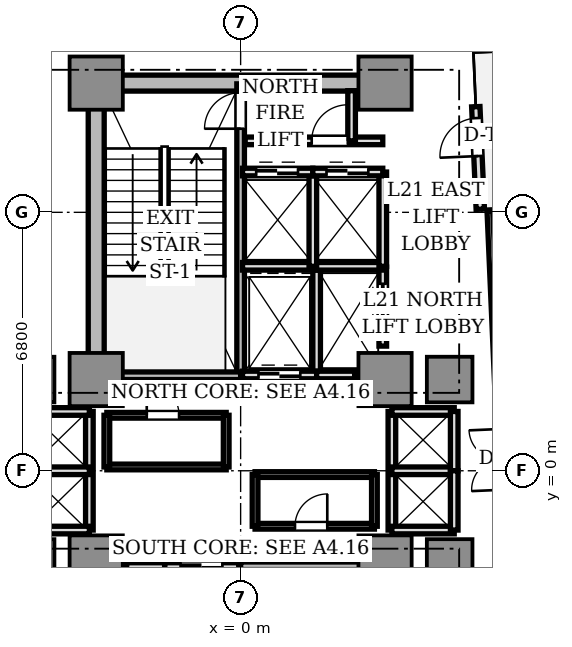
"""IFC4 building model, lengths in metres.
Left out: names, types, materials, properties, quantities, classifications, styles, units other than length and angle.
Written with IfcOpenShell. Run it as: python <this file> out.ifc"""

import sys

from ifc_helpers import new_model, si_unit, direction, frame, frame_2d, origin, origin_2d, place, context, subcontext, project, spatial, rectangle, extrude, source, transform, mapped, element, fill, save


model = new_model("IFC4")
c1 = context("Model", 3, precision=1e-05, world=origin(), true_north=direction((0.0, 1.0)))
c2 = subcontext(c1, "Body", "Model", "MODEL_VIEW")
j1 = project(units=[si_unit("LENGTHUNIT", "METRE"), si_unit("PLANEANGLEUNIT", "RADIAN")], contexts=[c1])
p1 = place(None, origin())
s1 = spatial("IfcSite", under=j1, at=p1, CompositionType="ELEMENT")
p2 = place(p1, origin())
s2 = spatial("IfcBuilding", under=s1, at=p2, CompositionType="ELEMENT")
p3 = place(p2, frame((0.0, 0.0, 79.0)))
s3 = spatial("IfcBuildingStorey", under=s2, at=p3, CompositionType="ELEMENT", Elevation=79.0)
p4 = place(p3, frame((-3.55, 10.2, 0.0), z_axis=(0.0, 0.0, 1.0), x_axis=(1.0, 0.0, 0.0)))
e1 = element("IfcWall", 1, at=p4, inside=s3, PredefinedType="SHEAR", context=c2, shape_type="SweptSolid", body=[
    extrude(rectangle(XDim=7.1, YDim=0.42, at=frame_2d((3.55, 0.0))), origin(), (0.0, 0.0, 1.0), 4.26),
])
p5 = place(p3, frame((-3.8, 2.85, 0.0), z_axis=(0.0, 0.0, 1.0), x_axis=(0.0, 1.0, 0.0)))
e2 = element("IfcWall", 2, at=p5, inside=s3, PredefinedType="SHEAR", context=c2, shape_type="SweptSolid", body=[
    extrude(rectangle(XDim=6.9, YDim=0.42, at=frame_2d((3.45, 0.0))), origin(), (0.0, 0.0, 1.0), 4.26),
])
m1 = source(origin(), c2, "Body", "SweptSolid", [
    extrude(rectangle(XDim=1.4, YDim=1.4, at=origin_2d()), origin(), (0.0, 0.0, 1.0), 4.26),
])
for number, where, z_axis, x_axis in (
    (3, (-3.8, 2.4, 0.0), (0.0, 0.0, 1.0), (1.0, 0.0, 0.0)),
    (4, (3.8, 2.4, 0.0), (0.0, 0.0, 1.0), (1.0, 0.0, 0.0)),
    (5, (-3.8, 10.2, 0.0), (0.0, 0.0, 1.0), (1.0, 0.0, 0.0)),
    (6, (3.8, 10.2, 0.0), (0.0, 0.0, 1.0), (1.0, 0.0, 0.0)),
    (7, (-3.8, -2.4, 0.0), (0.0, 0.0, 1.0), (1.0, 0.0, 0.0)),
    (8, (3.8, -2.4, 0.0), (0.0, 0.0, 1.0), (1.0, 0.0, 0.0)),
):
    element("IfcColumn", number, at=place(p3, frame(where, z_axis=z_axis, x_axis=x_axis)), inside=s3, PredefinedType="COLUMN", context=c2, shape_type="MappedRepresentation", body=[
        mapped(m1, transform((0.0, 0.0, 0.0), scale=1.0)),
    ])
m2 = source(origin(), c2, "Body", "SweptSolid", [
    extrude(rectangle(XDim=1.2, YDim=1.2, at=origin_2d()), origin(), (0.0, 0.0, 1.0), 4.26),
])
for number, where, z_axis, x_axis in (
    (9, (5.5, 2.4, 0.0), (0.0, 0.0, 1.0), (1.0, 0.0, 0.0)),
    (10, (-5.5, 2.4, 0.0), (0.0, 0.0, 1.0), (1.0, 0.0, 0.0)),
    (11, (5.5, -2.4, 0.0), (0.0, 0.0, 1.0), (1.0, 0.0, 0.0)),
    (12, (-5.5, -2.4, 0.0), (0.0, 0.0, 1.0), (1.0, 0.0, 0.0)),
):
    element("IfcColumn", number, at=place(p3, frame(where, z_axis=z_axis, x_axis=x_axis)), inside=s3, PredefinedType="COLUMN", context=c2, shape_type="MappedRepresentation", body=[
        mapped(m2, transform((0.0, 0.0, 0.0), scale=1.0)),
    ])
p6 = place(p3, frame((6.306, 6.882, 0.0), z_axis=(0.0, 0.0, 1.0), x_axis=(-0.043672655174, 0.999045894436, 0.0)))
e13 = element("IfcWall", 13, at=p6, inside=s3, PredefinedType="STANDARD", context=c2, shape_type="SweptSolid", body=[
    extrude(rectangle(XDim=2.7, YDim=0.22, at=frame_2d((1.35, 0.0))), origin(), (0.0, 0.0, 1.0), 4.26),
])
p7 = place(p6, frame((1.4, 0.0, 0.0)))
e14 = element("IfcOpeningElement", 14, at=p7, cuts=e13, PredefinedType="OPENING", context=c2, shape_type="SweptSolid", body=[
    extrude(rectangle(XDim=1.0, YDim=2.2, at=frame_2d((0.5, 1.1))), frame((0.0, 0.12, 0.0), z_axis=(0.0, -1.0, 0.0), x_axis=(1.0, 0.0, 0.0)), (0.0, 0.0, 1.0), 0.24),
])
p8 = place(p3, frame((0.0, 2.5, 0.0), z_axis=(0.0, 0.0, 1.0), x_axis=(0.0, 1.0, 0.0)))
e15 = element("IfcWall", 15, at=p8, inside=s3, PredefinedType="SOLIDWALL", context=c2, shape_type="SweptSolid", body=[
    extrude(rectangle(XDim=7.68, YDim=0.2, at=frame_2d((3.84, 0.0))), origin(), (0.0, 0.0, 1.0), 4.26),
])
p9 = place(p8, frame((6.5, 0.0, 0.0)))
e16 = element("IfcOpeningElement", 16, at=p9, cuts=e15, PredefinedType="OPENING", context=c2, shape_type="SweptSolid", body=[
    extrude(rectangle(XDim=0.95, YDim=2.15, at=frame_2d((0.475, 1.075))), frame((0.0, 0.11, 0.0), z_axis=(0.0, -1.0, 0.0), x_axis=(1.0, 0.0, 0.0)), (0.0, 0.0, 1.0), 0.22),
])
p10 = place(p3, frame((-3.72, 2.5, 0.0), z_axis=(0.0, 0.0, 1.0), x_axis=(1.0, 0.0, 0.0)))
e17 = element("IfcWall", 17, at=p10, inside=s3, PredefinedType="SOLIDWALL", context=c2, shape_type="SweptSolid", body=[
    extrude(rectangle(XDim=3.72, YDim=0.2, at=frame_2d((1.86, 0.0))), origin(), (0.0, 0.0, 1.0), 4.26),
])
p11 = place(p3, frame((0.0, -10.18, 0.0), z_axis=(0.0, 0.0, 1.0), x_axis=(0.0, 1.0, 0.0)))
e18 = element("IfcWall", 18, at=p11, inside=s3, PredefinedType="SOLIDWALL", context=c2, shape_type="SweptSolid", body=[
    extrude(rectangle(XDim=7.68, YDim=0.2, at=frame_2d((3.84, 0.0))), origin(), (0.0, 0.0, 1.0), 4.26),
])
p12 = place(p11, frame((0.28, 0.0, 0.0)))
e19 = element("IfcOpeningElement", 19, at=p12, cuts=e18, PredefinedType="OPENING", context=c2, shape_type="SweptSolid", body=[
    extrude(rectangle(XDim=1.1, YDim=2.15, at=frame_2d((0.55, 1.075))), frame((0.0, 0.11, 0.0), z_axis=(0.0, -1.0, 0.0), x_axis=(1.0, 0.0, 0.0)), (0.0, 0.0, 1.0), 0.22),
])
p13 = place(p3, frame((0.0, -2.5, 0.0), z_axis=(0.0, 0.0, 1.0), x_axis=(1.0, 0.0, 0.0)))
e20 = element("IfcWall", 20, at=p13, inside=s3, PredefinedType="SOLIDWALL", context=c2, shape_type="SweptSolid", body=[
    extrude(rectangle(XDim=3.72, YDim=0.2, at=frame_2d((1.86, 0.0))), origin(), (0.0, 0.0, 1.0), 4.26),
])
p14 = place(p3, frame((2.0, 2.5, 0.0), z_axis=(0.0, 0.0, 1.0), x_axis=(0.0, 1.0, 0.0)))
e21 = element("IfcWall", 21, at=p14, inside=s3, PredefinedType="SOLIDWALL", context=c2, shape_type="SweptSolid", body=[
    extrude(rectangle(XDim=2.78, YDim=0.2, at=frame_2d((1.39, 0.0))), origin(), (0.0, 0.0, 1.0), 3.81),
])
p15 = place(p3, frame((0.05, 2.52, 0.0), z_axis=(0.0, 0.0, 1.0), x_axis=(1.0, 0.0, 0.0)))
e22 = element("IfcWall", 22, at=p15, inside=s3, PredefinedType="SOLIDWALL", context=c2, shape_type="SweptSolid", body=[
    extrude(rectangle(XDim=1.95, YDim=0.2, at=frame_2d((0.975, 0.0))), origin(), (0.0, 0.0, 1.0), 3.81),
])
p16 = place(p15, frame((0.42, 0.0, 0.0)))
e23 = element("IfcOpeningElement", 23, at=p16, cuts=e22, PredefinedType="OPENING", context=c2, shape_type="SweptSolid", body=[
    extrude(rectangle(XDim=1.1, YDim=2.2, at=frame_2d((0.55, 1.1))), frame((0.0, 0.11, 0.0), z_axis=(0.0, -1.0, 0.0), x_axis=(1.0, 0.0, 0.0)), (0.0, 0.0, 1.0), 0.22),
])
p17 = place(p3, frame((-2.0, -5.28, 0.0), z_axis=(0.0, 0.0, 1.0), x_axis=(0.0, 1.0, 0.0)))
e24 = element("IfcWall", 24, at=p17, inside=s3, PredefinedType="SOLIDWALL", context=c2, shape_type="SweptSolid", body=[
    extrude(rectangle(XDim=2.78, YDim=0.2, at=frame_2d((1.39, 0.0))), origin(), (0.0, 0.0, 1.0), 3.81),
])
p18 = place(p3, frame((-2.0, -2.52, 0.0), z_axis=(0.0, 0.0, 1.0), x_axis=(1.0, 0.0, 0.0)))
e25 = element("IfcWall", 25, at=p18, inside=s3, PredefinedType="SOLIDWALL", context=c2, shape_type="SweptSolid", body=[
    extrude(rectangle(XDim=1.95, YDim=0.2, at=frame_2d((0.975, 0.0))), origin(), (0.0, 0.0, 1.0), 3.81),
])
p19 = place(p18, frame((0.42, 0.0, 0.0)))
e26 = element("IfcOpeningElement", 26, at=p19, cuts=e25, PredefinedType="OPENING", context=c2, shape_type="SweptSolid", body=[
    extrude(rectangle(XDim=1.1, YDim=2.2, at=frame_2d((0.55, 1.1))), frame((0.0, 0.11, 0.0), z_axis=(0.0, -1.0, 0.0), x_axis=(1.0, 0.0, 0.0)), (0.0, 0.0, 1.0), 0.22),
])
p20 = place(p3, frame((2.0, 2.52, 0.0), z_axis=(0.0, 0.0, 1.0), x_axis=(1.0, 0.0, 0.0)))
e27 = element("IfcWall", 27, at=p20, inside=s3, PredefinedType="SOLIDWALL", context=c2, shape_type="SweptSolid", body=[
    extrude(rectangle(XDim=1.0, YDim=0.2, at=frame_2d((0.5, 0.0))), origin(), (0.0, 0.0, 1.0), 3.81),
])
p21 = place(p3, frame((3.74, 3.28, 0.0), z_axis=(0.0, 0.0, 1.0), x_axis=(0.0, 1.0, 0.0)))
e28 = element("IfcWall", 28, at=p21, inside=s3, PredefinedType="SOLIDWALL", context=c2, shape_type="SweptSolid", body=[
    extrude(rectangle(XDim=2.08, YDim=0.2, at=frame_2d((1.04, 0.0))), origin(), (0.0, 0.0, 1.0), 3.81),
])
p22 = place(p21, frame((0.44, 0.0, 0.0)))
e29 = element("IfcOpeningElement", 29, at=p22, cuts=e28, PredefinedType="OPENING", context=c2, shape_type="SweptSolid", body=[
    extrude(rectangle(XDim=1.2, YDim=2.2, at=frame_2d((0.6, 1.1))), frame((0.0, 0.11, 0.0), z_axis=(0.0, -1.0, 0.0), x_axis=(1.0, 0.0, 0.0)), (0.0, 0.0, 1.0), 0.22),
])
p23 = place(p3, frame((-3.0, -2.52, 0.0), z_axis=(0.0, 0.0, 1.0), x_axis=(1.0, 0.0, 0.0)))
e30 = element("IfcWall", 30, at=p23, inside=s3, PredefinedType="SOLIDWALL", context=c2, shape_type="SweptSolid", body=[
    extrude(rectangle(XDim=1.0, YDim=0.2, at=frame_2d((0.5, 0.0))), origin(), (0.0, 0.0, 1.0), 3.81),
])
p24 = place(p3, frame((0.05, 5.38, 0.0), z_axis=(0.0, 0.0, 1.0), x_axis=(1.0, 0.0, 0.0)))
e31 = element("IfcWall", 31, at=p24, inside=s3, PredefinedType="SOLIDWALL", context=c2, shape_type="SweptSolid", body=[
    extrude(rectangle(XDim=3.69, YDim=0.2, at=frame_2d((1.845, 0.0))), origin(), (0.0, 0.0, 1.0), 3.81),
])
p25 = place(p3, frame((1.9, 5.38, 0.0), z_axis=(0.0, 0.0, 1.0), x_axis=(0.0, 1.0, 0.0)))
e32 = element("IfcWall", 32, at=p25, inside=s3, PredefinedType="SOLIDWALL", context=c2, shape_type="SweptSolid", body=[
    extrude(rectangle(XDim=2.48, YDim=0.2, at=frame_2d((1.24, 0.0))), origin(), (0.0, 0.0, 1.0), 3.81),
])
p26 = place(p3, frame((0.05, 7.86, 0.0), z_axis=(0.0, 0.0, 1.0), x_axis=(1.0, 0.0, 0.0)))
e33 = element("IfcWall", 33, at=p26, inside=s3, PredefinedType="SOLIDWALL", context=c2, shape_type="SweptSolid", body=[
    extrude(rectangle(XDim=1.85, YDim=0.2, at=frame_2d((0.925, 0.0))), origin(), (0.0, 0.0, 1.0), 3.81),
])
p27 = place(p26, frame((0.36, 0.0, 0.0)))
e34 = element("IfcOpeningElement", 34, at=p27, cuts=e33, PredefinedType="OPENING", context=c2, shape_type="SweptSolid", body=[
    extrude(rectangle(XDim=1.1, YDim=2.2, at=frame_2d((0.55, 1.1))), frame((0.0, 0.11, 0.0), z_axis=(0.0, -1.0, 0.0), x_axis=(1.0, 0.0, 0.0)), (0.0, 0.0, 1.0), 0.22),
])
p28 = place(p3, frame((3.74, 5.38, 0.0), z_axis=(0.0, 0.0, 1.0), x_axis=(0.0, 1.0, 0.0)))
e35 = element("IfcWall", 35, at=p28, inside=s3, PredefinedType="SOLIDWALL", context=c2, shape_type="SweptSolid", body=[
    extrude(rectangle(XDim=2.48, YDim=0.2, at=frame_2d((1.24, 0.0))), origin(), (0.0, 0.0, 1.0), 3.81),
])
p29 = place(p3, frame((1.9, 7.86, 0.0), z_axis=(0.0, 0.0, 1.0), x_axis=(1.0, 0.0, 0.0)))
e36 = element("IfcWall", 36, at=p29, inside=s3, PredefinedType="SOLIDWALL", context=c2, shape_type="SweptSolid", body=[
    extrude(rectangle(XDim=1.84, YDim=0.2, at=frame_2d((0.92, 0.0))), origin(), (0.0, 0.0, 1.0), 3.81),
])
p30 = place(p29, frame((0.36, 0.0, 0.0)))
e37 = element("IfcOpeningElement", 37, at=p30, cuts=e36, PredefinedType="OPENING", context=c2, shape_type="SweptSolid", body=[
    extrude(rectangle(XDim=1.1, YDim=2.2, at=frame_2d((0.55, 1.1))), frame((0.0, 0.11, 0.0), z_axis=(0.0, -1.0, 0.0), x_axis=(1.0, 0.0, 0.0)), (0.0, 0.0, 1.0), 0.22),
])
p31 = place(p3, frame((3.98, -1.56, 0.0), z_axis=(0.0, 0.0, 1.0), x_axis=(0.0, 1.0, 0.0)))
e38 = element("IfcWall", 38, at=p31, inside=s3, PredefinedType="SOLIDWALL", context=c2, shape_type="SweptSolid", body=[
    extrude(rectangle(XDim=3.12, YDim=0.2, at=frame_2d((1.56, 0.0))), origin(), (0.0, 0.0, 1.0), 3.43),
])
for number, where, z_axis, x_axis in (
    (39, (3.98, 1.56, 0.0), (0.0, 0.0, 1.0), (1.0, 0.0, 0.0)),
    (40, (3.98, -1.56, 0.0), (0.0, 0.0, 1.0), (1.0, 0.0, 0.0)),
    (41, (3.98, 0.0, 0.0), (0.0, 0.0, 1.0), (1.0, 0.0, 0.0)),
):
    element("IfcWall", number, at=place(p3, frame(where, z_axis=z_axis, x_axis=x_axis)), inside=s3, PredefinedType="SOLIDWALL", context=c2, shape_type="SweptSolid", body=[
        extrude(rectangle(XDim=1.64, YDim=0.2, at=frame_2d((0.82, 0.0))), origin(), (0.0, 0.0, 1.0), 3.81),
    ])
for number, where, z_axis, x_axis in (
    (42, (5.62, 0.0, 0.0), (0.0, 0.0, 1.0), (0.0, 1.0, 0.0)),
    (43, (5.62, -1.56, 0.0), (0.0, 0.0, 1.0), (0.0, 1.0, 0.0)),
):
    element("IfcWall", number, at=place(p3, frame(where, z_axis=z_axis, x_axis=x_axis)), inside=s3, PredefinedType="SOLIDWALL", context=c2, shape_type="SweptSolid", body=[
        extrude(rectangle(XDim=1.56, YDim=0.2, at=frame_2d((0.78, 0.0))), origin(), (0.0, 0.0, 1.0), 3.81),
    ])
p32 = place(p3, frame((-3.98, -1.56, 0.0), z_axis=(0.0, 0.0, 1.0), x_axis=(0.0, 1.0, 0.0)))
e44 = element("IfcWall", 44, at=p32, inside=s3, PredefinedType="SOLIDWALL", context=c2, shape_type="SweptSolid", body=[
    extrude(rectangle(XDim=3.12, YDim=0.2, at=frame_2d((1.56, 0.0))), origin(), (0.0, 0.0, 1.0), 3.43),
])
for number, where, z_axis, x_axis in (
    (45, (-5.62, 1.56, 0.0), (0.0, 0.0, 1.0), (1.0, 0.0, 0.0)),
    (46, (-5.62, -1.56, 0.0), (0.0, 0.0, 1.0), (1.0, 0.0, 0.0)),
    (47, (-5.62, 0.0, 0.0), (0.0, 0.0, 1.0), (1.0, 0.0, 0.0)),
):
    element("IfcWall", number, at=place(p3, frame(where, z_axis=z_axis, x_axis=x_axis)), inside=s3, PredefinedType="SOLIDWALL", context=c2, shape_type="SweptSolid", body=[
        extrude(rectangle(XDim=1.64, YDim=0.2, at=frame_2d((0.82, 0.0))), origin(), (0.0, 0.0, 1.0), 3.81),
    ])
p33 = place(p3, frame((0.12, 8.68, 0.0), z_axis=(0.0, 0.0, 1.0), x_axis=(1.0, 0.0, 0.0)))
e48 = element("IfcWall", 48, at=p33, inside=s3, PredefinedType="SOLIDWALL", context=c2, shape_type="SweptSolid", body=[
    extrude(rectangle(XDim=3.62, YDim=0.2, at=frame_2d((1.81, 0.0))), origin(), (0.0, 0.0, 1.0), 3.81),
])
p34 = place(p33, frame((1.75, 0.0, 0.0)))
e49 = element("IfcOpeningElement", 49, at=p34, cuts=e48, PredefinedType="OPENING", context=c2, shape_type="SweptSolid", body=[
    extrude(rectangle(XDim=0.95, YDim=2.15, at=frame_2d((0.475, 1.075))), frame((0.0, 0.11, 0.0), z_axis=(0.0, -1.0, 0.0), x_axis=(1.0, 0.0, 0.0)), (0.0, 0.0, 1.0), 0.22),
])
p35 = place(p3, frame((2.92, 8.68, 0.0), z_axis=(0.0, 0.0, 1.0), x_axis=(0.0, 1.0, 0.0)))
e50 = element("IfcWall", 50, at=p35, inside=s3, PredefinedType="SOLIDWALL", context=c2, shape_type="SweptSolid", body=[
    extrude(rectangle(XDim=1.32, YDim=0.2, at=frame_2d((0.66, 0.0))), origin(), (0.0, 0.0, 1.0), 3.81),
])
p36 = place(p3, frame((-3.52, 0.1, 0.0), z_axis=(0.0, 0.0, 1.0), x_axis=(1.0, 0.0, 0.0)))
e51 = element("IfcWall", 51, at=p36, inside=s3, PredefinedType="PARTITIONING", context=c2, shape_type="SweptSolid", body=[
    extrude(rectangle(XDim=3.14, YDim=0.15, at=frame_2d((1.57, 0.0))), origin(), (0.0, 0.0, 1.0), 3.81),
])
p37 = place(p3, frame((-3.52, 1.46, 0.0), z_axis=(0.0, 0.0, 1.0), x_axis=(1.0, 0.0, 0.0)))
e52 = element("IfcWall", 52, at=p37, inside=s3, PredefinedType="PARTITIONING", context=c2, shape_type="SweptSolid", body=[
    extrude(rectangle(XDim=3.14, YDim=0.15, at=frame_2d((1.57, 0.0))), origin(), (0.0, 0.0, 1.0), 3.81),
])
p38 = place(p37, frame((1.05, 0.0, 0.0)))
e53 = element("IfcOpeningElement", 53, at=p38, cuts=e52, PredefinedType="OPENING", context=c2, shape_type="SweptSolid", body=[
    extrude(rectangle(XDim=0.85, YDim=2.1, at=frame_2d((0.425, 1.05))), frame((0.0, 0.085, 0.0), z_axis=(0.0, -1.0, 0.0), x_axis=(1.0, 0.0, 0.0)), (0.0, 0.0, 1.0), 0.17),
])
p39 = place(p3, frame((-3.52, 0.1, 0.0), z_axis=(0.0, 0.0, 1.0), x_axis=(0.0, 1.0, 0.0)))
e54 = element("IfcWall", 54, at=p39, inside=s3, PredefinedType="PARTITIONING", context=c2, shape_type="SweptSolid", body=[
    extrude(rectangle(XDim=1.36, YDim=0.15, at=frame_2d((0.68, 0.0))), origin(), (0.0, 0.0, 1.0), 3.43),
])
p40 = place(p3, frame((-0.38, 0.1, 0.0), z_axis=(0.0, 0.0, 1.0), x_axis=(0.0, 1.0, 0.0)))
e55 = element("IfcWall", 55, at=p40, inside=s3, PredefinedType="PARTITIONING", context=c2, shape_type="SweptSolid", body=[
    extrude(rectangle(XDim=1.36, YDim=0.15, at=frame_2d((0.68, 0.0))), origin(), (0.0, 0.0, 1.0), 3.81),
])
p41 = place(p3, frame((0.38, -0.1, 0.0), z_axis=(0.0, 0.0, 1.0), x_axis=(1.0, 0.0, 0.0)))
e56 = element("IfcWall", 56, at=p41, inside=s3, PredefinedType="PARTITIONING", context=c2, shape_type="SweptSolid", body=[
    extrude(rectangle(XDim=3.14, YDim=0.15, at=frame_2d((1.57, 0.0))), origin(), (0.0, 0.0, 1.0), 3.81),
])
p42 = place(p3, frame((0.38, -1.46, 0.0), z_axis=(0.0, 0.0, 1.0), x_axis=(1.0, 0.0, 0.0)))
e57 = element("IfcWall", 57, at=p42, inside=s3, PredefinedType="PARTITIONING", context=c2, shape_type="SweptSolid", body=[
    extrude(rectangle(XDim=3.14, YDim=0.15, at=frame_2d((1.57, 0.0))), origin(), (0.0, 0.0, 1.0), 3.81),
])
p43 = place(p42, frame((1.05, 0.0, 0.0)))
e58 = element("IfcOpeningElement", 58, at=p43, cuts=e57, PredefinedType="OPENING", context=c2, shape_type="SweptSolid", body=[
    extrude(rectangle(XDim=0.85, YDim=2.1, at=frame_2d((0.425, 1.05))), frame((0.0, 0.085, 0.0), z_axis=(0.0, -1.0, 0.0), x_axis=(1.0, 0.0, 0.0)), (0.0, 0.0, 1.0), 0.17),
])
p44 = place(p3, frame((0.38, -1.46, 0.0), z_axis=(0.0, 0.0, 1.0), x_axis=(0.0, 1.0, 0.0)))
e59 = element("IfcWall", 59, at=p44, inside=s3, PredefinedType="PARTITIONING", context=c2, shape_type="SweptSolid", body=[
    extrude(rectangle(XDim=1.36, YDim=0.15, at=frame_2d((0.68, 0.0))), origin(), (0.0, 0.0, 1.0), 3.81),
])
p45 = place(p3, frame((3.52, -1.46, 0.0), z_axis=(0.0, 0.0, 1.0), x_axis=(0.0, 1.0, 0.0)))
e60 = element("IfcWall", 60, at=p45, inside=s3, PredefinedType="PARTITIONING", context=c2, shape_type="SweptSolid", body=[
    extrude(rectangle(XDim=1.36, YDim=0.15, at=frame_2d((0.68, 0.0))), origin(), (0.0, 0.0, 1.0), 3.43),
])
p46 = place(p3, frame((7.129, -6.245, 0.0), z_axis=(0.0, 0.0, 1.0), x_axis=(-0.043609488494, 0.999048653727, 0.0)))
e61 = element("IfcWall", 61, at=p46, inside=s3, PredefinedType="PARTITIONING", context=c2, shape_type="SweptSolid", body=[
    extrude(rectangle(XDim=13.1, YDim=0.15, at=frame_2d((6.55, 0.0))), origin(), (0.0, 0.0, 1.0), 3.81),
])
p47 = place(p46, frame((5.75, 0.0, 0.0)))
e62 = element("IfcOpeningElement", 62, at=p47, cuts=e61, PredefinedType="OPENING", context=c2, shape_type="SweptSolid", body=[
    extrude(rectangle(XDim=1.6, YDim=2.25, at=frame_2d((0.8, 1.125))), frame((0.0, 0.085, 0.0), z_axis=(0.0, -1.0, 0.0), x_axis=(1.0, 0.0, 0.0)), (0.0, 0.0, 1.0), 0.17),
])
m3 = source(origin(), c2, "Body", "SweptSolid", [
    extrude(rectangle(XDim=1.0, YDim=0.05, at=origin_2d()), origin(), (0.0, 0.0, 1.0), 2.2),
])
p48 = place(p7, frame((0.5, 0.0, 0.0)))
e63 = element("IfcDoor", 63, at=p48, inside=s3, OperationType="SINGLE_SWING_LEFT", PredefinedType="DOOR", context=c2, shape_type="MappedRepresentation", body=[
    mapped(m3, transform((0.0, 0.0, 0.0), scale=1.0)),
])
fill(e14, e63)
m4 = source(origin(), c2, "Body", "SweptSolid", [
    extrude(rectangle(XDim=1.1, YDim=0.05, at=origin_2d()), origin(), (0.0, 0.0, 1.0), 2.2),
])
p49 = place(p16, frame((0.55, 0.0, 0.0)))
e64 = element("IfcDoor", 64, at=p49, inside=s3, OperationType="DOUBLE_DOOR_SLIDING", PredefinedType="DOOR", context=c2, shape_type="MappedRepresentation", body=[
    mapped(m4, transform((0.0, 0.0, 0.0), scale=1.0)),
])
fill(e23, e64)
p50 = place(p19, frame((0.55, 0.0, 0.0)))
e65 = element("IfcDoor", 65, at=p50, inside=s3, OperationType="DOUBLE_DOOR_SLIDING", PredefinedType="DOOR", context=c2, shape_type="MappedRepresentation", body=[
    mapped(m4, transform((0.0, 0.0, 0.0), scale=1.0)),
])
fill(e26, e65)
m5 = source(origin(), c2, "Body", "SweptSolid", [
    extrude(rectangle(XDim=1.2, YDim=0.05, at=origin_2d()), origin(), (0.0, 0.0, 1.0), 2.2),
])
p51 = place(p22, frame((0.6, 0.0, 0.0)))
e66 = element("IfcDoor", 66, at=p51, inside=s3, OperationType="DOUBLE_DOOR_SLIDING", PredefinedType="DOOR", context=c2, shape_type="MappedRepresentation", body=[
    mapped(m5, transform((0.0, 0.0, 0.0), scale=1.0)),
])
fill(e29, e66)
p52 = place(p27, frame((0.55, 0.0, 0.0)))
e67 = element("IfcDoor", 67, at=p52, inside=s3, OperationType="DOUBLE_DOOR_SLIDING", PredefinedType="DOOR", context=c2, shape_type="MappedRepresentation", body=[
    mapped(m4, transform((0.0, 0.0, 0.0), scale=1.0)),
])
fill(e34, e67)
p53 = place(p30, frame((0.55, 0.0, 0.0)))
e68 = element("IfcDoor", 68, at=p53, inside=s3, OperationType="DOUBLE_DOOR_SLIDING", PredefinedType="DOOR", context=c2, shape_type="MappedRepresentation", body=[
    mapped(m4, transform((0.0, 0.0, 0.0), scale=1.0)),
])
fill(e37, e68)
m6 = source(origin(), c2, "Body", "SweptSolid", [
    extrude(rectangle(XDim=0.95, YDim=0.05, at=origin_2d()), origin(), (0.0, 0.0, 1.0), 2.15),
])
p54 = place(p9, frame((0.475, 0.0, 0.0)))
e69 = element("IfcDoor", 69, at=p54, inside=s3, OperationType="SINGLE_SWING_LEFT", PredefinedType="DOOR", context=c2, shape_type="MappedRepresentation", body=[
    mapped(m6, transform((0.0, 0.0, 0.0), scale=1.0)),
])
fill(e16, e69)
p55 = place(p34, frame((0.475, 0.0, 0.0)))
e70 = element("IfcDoor", 70, at=p55, inside=s3, OperationType="SINGLE_SWING_RIGHT", PredefinedType="DOOR", context=c2, shape_type="MappedRepresentation", body=[
    mapped(m6, transform((0.0, 0.0, 0.0), scale=1.0)),
])
fill(e49, e70)
m7 = source(origin(), c2, "Body", "SweptSolid", [
    extrude(rectangle(XDim=0.85, YDim=0.05, at=origin_2d()), origin(), (0.0, 0.0, 1.0), 2.1),
])
p56 = place(p38, frame((0.425, 0.0, 0.0)))
e71 = element("IfcDoor", 71, at=p56, inside=s3, OperationType="SINGLE_SWING_LEFT", PredefinedType="DOOR", context=c2, shape_type="MappedRepresentation", body=[
    mapped(m7, transform((0.0, 0.0, 0.0), scale=1.0)),
])
fill(e53, e71)
p57 = place(p43, frame((0.425, 0.0, 0.0)))
e72 = element("IfcDoor", 72, at=p57, inside=s3, OperationType="SINGLE_SWING_RIGHT", PredefinedType="DOOR", context=c2, shape_type="MappedRepresentation", body=[
    mapped(m7, transform((0.0, 0.0, 0.0), scale=1.0)),
])
fill(e58, e72)
save(model, sys.argv[1])
